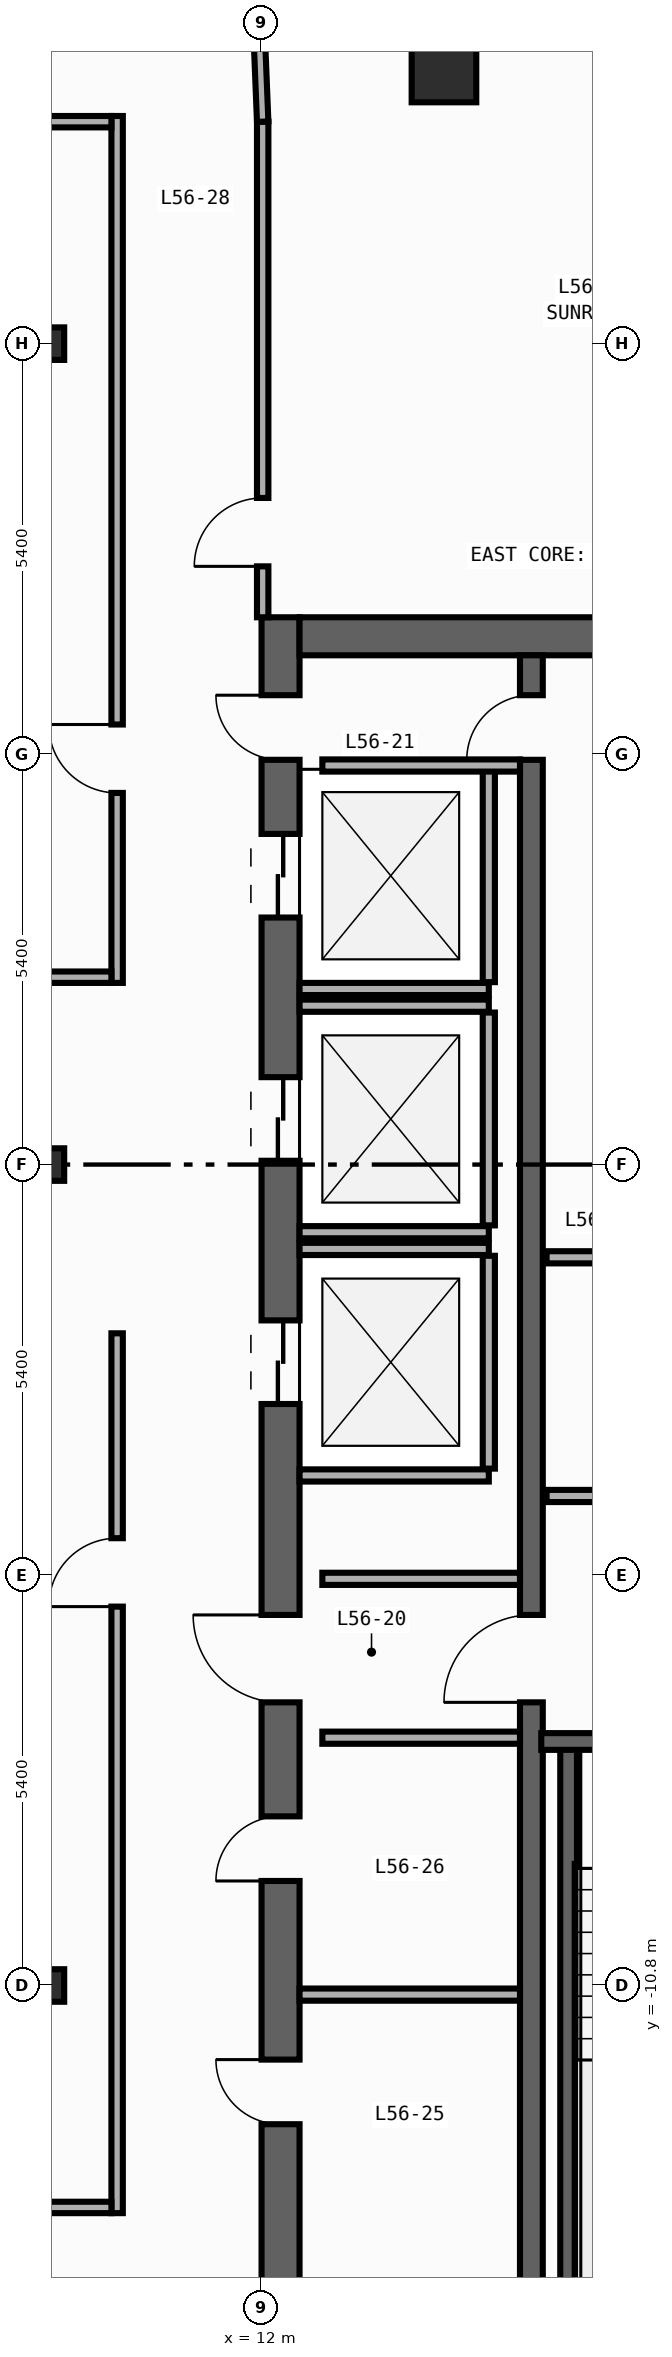
"""IFC4 building model, lengths in metres.
Left out: names, types, materials, properties, quantities, classifications, styles, units other than length and angle.
Written with IfcOpenShell. Run it as: python <this file> out.ifc"""

import sys

from ifc_helpers import new_model, si_unit, direction, frame, frame_2d, origin, origin_2d, place, context, subcontext, project, spatial, rectangle, i_section, extrude, element, fill, save


model = new_model("IFC4")
c1 = context("Model", 3, precision=1e-05, world=origin(), true_north=direction((0.0, 1.0)))
c2 = subcontext(c1, "Body", "Model", "MODEL_VIEW")
j1 = project(units=[si_unit("LENGTHUNIT", "METRE"), si_unit("PLANEANGLEUNIT", "RADIAN")], contexts=[c1])
p1 = place(None, origin())
s1 = spatial("IfcSite", under=j1, at=p1, CompositionType="ELEMENT")
p2 = place(p1, origin())
s2 = spatial("IfcBuilding", under=s1, at=p2, CompositionType="ELEMENT")
p3 = place(p2, frame((0.0, 0.0, 240.4)))
s3 = spatial("IfcBuildingStorey", under=s2, at=p3, CompositionType="ELEMENT", Elevation=240.4)
p4 = place(p3, frame((12.25, -19.8, 0.0), z_axis=(0.0, 0.0, 1.0), x_axis=(0.0, 1.0, 0.0)))
e1 = element("IfcWall", 1, at=p4, inside=s3, PredefinedType="SHEAR", context=c2, shape_type="SweptSolid", body=[
    extrude(rectangle(XDim=27.0, YDim=0.5, at=frame_2d((13.5, 0.0))), origin(), (0.0, 0.0, 1.0), 3.34),
])
p5 = place(p4, frame((23.05, 0.0, 0.0)))
e2 = element("IfcOpeningElement", 2, at=p5, cuts=e1, PredefinedType="OPENING", context=c2, shape_type="SweptSolid", body=[
    extrude(rectangle(XDim=1.1, YDim=2.2, at=frame_2d((0.55, 1.1))), frame((0.0, 0.26, 0.0), z_axis=(0.0, -1.0, 0.0), x_axis=(1.0, 0.0, 0.0)), (0.0, 0.0, 1.0), 0.52),
])
p6 = place(p4, frame((19.85, 0.0, 0.0)))
e3 = element("IfcOpeningElement", 3, at=p6, cuts=e1, PredefinedType="OPENING", context=c2, shape_type="SweptSolid", body=[
    extrude(rectangle(XDim=1.1, YDim=2.2, at=frame_2d((0.55, 1.1))), frame((0.0, 0.26, 0.0), z_axis=(0.0, -1.0, 0.0), x_axis=(1.0, 0.0, 0.0)), (0.0, 0.0, 1.0), 0.52),
])
p7 = place(p4, frame((16.65, 0.0, 0.0)))
e4 = element("IfcOpeningElement", 4, at=p7, cuts=e1, PredefinedType="OPENING", context=c2, shape_type="SweptSolid", body=[
    extrude(rectangle(XDim=1.1, YDim=2.2, at=frame_2d((0.55, 1.1))), frame((0.0, 0.26, 0.0), z_axis=(0.0, -1.0, 0.0), x_axis=(1.0, 0.0, 0.0)), (0.0, 0.0, 1.0), 0.52),
])
p8 = place(p4, frame((7.175, 0.0, 0.0)))
e5 = element("IfcOpeningElement", 5, at=p8, cuts=e1, PredefinedType="OPENING", context=c2, shape_type="SweptSolid", body=[
    extrude(rectangle(XDim=0.85, YDim=2.1, at=frame_2d((0.425, 1.05))), frame((0.0, 0.26, 0.0), z_axis=(0.0, -1.0, 0.0), x_axis=(1.0, 0.0, 0.0)), (0.0, 0.0, 1.0), 0.52),
])
p9 = place(p4, frame((10.375, 0.0, 0.0)))
e6 = element("IfcOpeningElement", 6, at=p9, cuts=e1, PredefinedType="OPENING", context=c2, shape_type="SweptSolid", body=[
    extrude(rectangle(XDim=0.85, YDim=2.1, at=frame_2d((0.425, 1.05))), frame((0.0, 0.26, 0.0), z_axis=(0.0, -1.0, 0.0), x_axis=(1.0, 0.0, 0.0)), (0.0, 0.0, 1.0), 0.52),
])
p10 = place(p4, frame((12.725, 0.0, 0.0)))
e7 = element("IfcOpeningElement", 7, at=p10, cuts=e1, PredefinedType="OPENING", context=c2, shape_type="SweptSolid", body=[
    extrude(rectangle(XDim=1.15, YDim=2.2, at=frame_2d((0.575, 1.1))), frame((0.0, 0.26, 0.0), z_axis=(0.0, -1.0, 0.0), x_axis=(1.0, 0.0, 0.0)), (0.0, 0.0, 1.0), 0.52),
])
p11 = place(p4, frame((25.125, 0.0, 0.0)))
e8 = element("IfcOpeningElement", 8, at=p11, cuts=e1, PredefinedType="OPENING", context=c2, shape_type="SweptSolid", body=[
    extrude(rectangle(XDim=0.85, YDim=2.1, at=frame_2d((0.425, 1.05))), frame((0.0, 0.26, 0.0), z_axis=(0.0, -1.0, 0.0), x_axis=(1.0, 0.0, 0.0)), (0.0, 0.0, 1.0), 0.52),
])
p12 = place(p3, frame((12.5, 6.95, 0.0), z_axis=(0.0, 0.0, 1.0), x_axis=(1.0, 0.0, 0.0)))
e9 = element("IfcWall", 9, at=p12, inside=s3, PredefinedType="SHEAR", context=c2, shape_type="SweptSolid", body=[
    extrude(rectangle(XDim=7.4, YDim=0.5, at=frame_2d((3.7, 0.0))), origin(), (0.0, 0.0, 1.0), 3.34),
])
p13 = place(p3, frame((15.55, -19.3, 0.0), z_axis=(0.0, 0.0, 1.0), x_axis=(0.0, 1.0, 0.0)))
e10 = element("IfcWall", 10, at=p13, inside=s3, PredefinedType="SHEAR", context=c2, shape_type="SweptSolid", body=[
    extrude(rectangle(XDim=26.0, YDim=0.3, at=frame_2d((13.0, 0.0))), origin(), (0.0, 0.0, 1.0), 3.34),
])
p14 = place(p13, frame((12.225, 0.0, 0.0)))
e11 = element("IfcOpeningElement", 11, at=p14, cuts=e10, PredefinedType="OPENING", context=c2, shape_type="SweptSolid", body=[
    extrude(rectangle(XDim=1.15, YDim=2.2, at=frame_2d((0.575, 1.1))), frame((0.0, 0.16, 0.0), z_axis=(0.0, -1.0, 0.0), x_axis=(1.0, 0.0, 0.0)), (0.0, 0.0, 1.0), 0.32),
])
p15 = place(p13, frame((24.625, 0.0, 0.0)))
e12 = element("IfcOpeningElement", 12, at=p15, cuts=e10, PredefinedType="OPENING", context=c2, shape_type="SweptSolid", body=[
    extrude(rectangle(XDim=0.85, YDim=2.1, at=frame_2d((0.425, 1.05))), frame((0.0, 0.16, 0.0), z_axis=(0.0, -1.0, 0.0), x_axis=(1.0, 0.0, 0.0)), (0.0, 0.0, 1.0), 0.32),
])
p16 = place(p3, frame((16.04, -19.01, 0.0), z_axis=(0.0, 0.0, 1.0), x_axis=(0.0, 1.0, 0.0)))
e13 = element("IfcWall", 13, at=p16, inside=s3, PredefinedType="SHEAR", context=c2, shape_type="SweptSolid", body=[
    extrude(rectangle(XDim=11.42, YDim=0.22, at=frame_2d((5.71, 0.0))), origin(), (0.0, 0.0, 1.0), 3.34),
])
p17 = place(p3, frame((19.92, -7.59, 0.0), z_axis=(0.0, 0.0, 1.0), x_axis=(-1.0, 0.0, 0.0)))
e14 = element("IfcWall", 14, at=p17, inside=s3, PredefinedType="SHEAR", context=c2, shape_type="SweptSolid", body=[
    extrude(rectangle(XDim=4.24, YDim=0.22, at=frame_2d((2.12, 0.0))), origin(), (0.0, 0.0, 1.0), 3.34),
])
p18 = place(p17, frame((1.08, 0.0, 0.0)))
e15 = element("IfcOpeningElement", 15, at=p18, cuts=e14, PredefinedType="OPENING", context=c2, shape_type="SweptSolid", body=[
    extrude(rectangle(XDim=1.1, YDim=2.2, at=frame_2d((0.55, 1.1))), frame((0.0, 0.12, 0.0), z_axis=(0.0, -1.0, 0.0), x_axis=(1.0, 0.0, 0.0)), (0.0, 0.0, 1.0), 0.24),
])
for number, where, z_axis, x_axis in (
    (16, (9.2, -10.8, 0.0), (0.0, 0.0, 1.0), (1.0, 0.0, 0.0)),
    (17, (9.2, 0.0, 0.0), (0.0, 0.0, 1.0), (1.0, 0.0, 0.0)),
    (18, (9.2, 10.8, 0.0), (0.0, 0.0, 1.0), (1.0, 0.0, 0.0)),
):
    element("IfcColumn", number, at=place(p3, frame(where, z_axis=z_axis, x_axis=x_axis)), inside=s3, PredefinedType="COLUMN", context=c2, shape_type="SweptSolid", body=[
        extrude(i_section(OverallWidth=0.407, OverallDepth=0.428, WebThickness=0.02, FlangeThickness=0.035, FilletRadius=0.022, at=origin_2d()), origin(), (0.0, 0.0, 1.0), 3.6),
    ])
p19 = place(p3, frame((14.4, 14.4, 0.0), z_axis=(0.0, 0.0, 1.0), x_axis=(1.0, 0.0, 0.0)))
e19 = element("IfcColumn", 19, at=p19, inside=s3, PredefinedType="COLUMN", context=c2, shape_type="SweptSolid", body=[
    extrude(rectangle(XDim=0.85, YDim=0.85, at=origin_2d()), origin(), (0.0, 0.0, 1.0), 3.6),
])
p20 = place(p3, frame((12.5, 2.31, 0.0), z_axis=(0.0, 0.0, 1.0), x_axis=(1.0, 0.0, 0.0)))
e20 = element("IfcWall", 20, at=p20, inside=s3, PredefinedType="STANDARD", context=c2, shape_type="SweptSolid", body=[
    extrude(rectangle(XDim=2.49, YDim=0.16, at=frame_2d((1.245, 0.0))), origin(), (0.0, 0.0, 1.0), 3.34),
])
p21 = place(p3, frame((14.99, 2.4, 0.0), z_axis=(0.0, 0.0, 1.0), x_axis=(0.0, 1.0, 0.0)))
e21 = element("IfcWall", 21, at=p21, inside=s3, PredefinedType="STANDARD", context=c2, shape_type="SweptSolid", body=[
    extrude(rectangle(XDim=2.8, YDim=0.16, at=frame_2d((1.4, 0.0))), origin(), (0.0, 0.0, 1.0), 3.34),
])
for number, where, z_axis, x_axis in (
    (22, (12.5, -0.89, 0.0), (0.0, 0.0, 1.0), (1.0, 0.0, 0.0)),
    (23, (12.5, 2.09, 0.0), (0.0, 0.0, 1.0), (1.0, 0.0, 0.0)),
):
    element("IfcWall", number, at=place(p3, frame(where, z_axis=z_axis, x_axis=x_axis)), inside=s3, PredefinedType="STANDARD", context=c2, shape_type="SweptSolid", body=[
        extrude(rectangle(XDim=2.49, YDim=0.16, at=frame_2d((1.245, 0.0))), origin(), (0.0, 0.0, 1.0), 3.34),
    ])
p22 = place(p3, frame((14.99, -0.8, 0.0), z_axis=(0.0, 0.0, 1.0), x_axis=(0.0, 1.0, 0.0)))
e24 = element("IfcWall", 24, at=p22, inside=s3, PredefinedType="STANDARD", context=c2, shape_type="SweptSolid", body=[
    extrude(rectangle(XDim=2.8, YDim=0.16, at=frame_2d((1.4, 0.0))), origin(), (0.0, 0.0, 1.0), 3.34),
])
for number, where, z_axis, x_axis in (
    (25, (12.5, -4.09, 0.0), (0.0, 0.0, 1.0), (1.0, 0.0, 0.0)),
    (26, (12.5, -1.11, 0.0), (0.0, 0.0, 1.0), (1.0, 0.0, 0.0)),
):
    element("IfcWall", number, at=place(p3, frame(where, z_axis=z_axis, x_axis=x_axis)), inside=s3, PredefinedType="STANDARD", context=c2, shape_type="SweptSolid", body=[
        extrude(rectangle(XDim=2.49, YDim=0.16, at=frame_2d((1.245, 0.0))), origin(), (0.0, 0.0, 1.0), 3.34),
    ])
p23 = place(p3, frame((14.99, -4.0, 0.0), z_axis=(0.0, 0.0, 1.0), x_axis=(0.0, 1.0, 0.0)))
e27 = element("IfcWall", 27, at=p23, inside=s3, PredefinedType="STANDARD", context=c2, shape_type="SweptSolid", body=[
    extrude(rectangle(XDim=2.8, YDim=0.16, at=frame_2d((1.4, 0.0))), origin(), (0.0, 0.0, 1.0), 3.34),
])
p24 = place(p3, frame((15.75, -4.36, 0.0), z_axis=(0.0, 0.0, 1.0), x_axis=(1.0, 0.0, 0.0)))
e28 = element("IfcWall", 28, at=p24, inside=s3, PredefinedType="STANDARD", context=c2, shape_type="SweptSolid", body=[
    extrude(rectangle(XDim=3.8, YDim=0.16, at=frame_2d((1.9, 0.0))), origin(), (0.0, 0.0, 1.0), 3.34),
])
p25 = place(p24, frame((1.47, 0.0, 0.0)))
e29 = element("IfcOpeningElement", 29, at=p25, cuts=e28, PredefinedType="OPENING", context=c2, shape_type="SweptSolid", body=[
    extrude(rectangle(XDim=1.15, YDim=2.2, at=frame_2d((0.575, 1.1))), frame((0.0, 0.09, 0.0), z_axis=(0.0, -1.0, 0.0), x_axis=(1.0, 0.0, 0.0)), (0.0, 0.0, 1.0), 0.18),
])
p26 = place(p3, frame((15.75, -1.22, 0.0), z_axis=(0.0, 0.0, 1.0), x_axis=(1.0, 0.0, 0.0)))
e30 = element("IfcWall", 30, at=p26, inside=s3, PredefinedType="STANDARD", context=c2, shape_type="SweptSolid", body=[
    extrude(rectangle(XDim=3.8, YDim=0.16, at=frame_2d((1.9, 0.0))), origin(), (0.0, 0.0, 1.0), 3.34),
])
for number, where, z_axis, x_axis in (
    (31, (12.8, -5.45, 0.0), (0.0, 0.0, 1.0), (1.0, 0.0, 0.0)),
    (32, (12.8, -7.54, 0.0), (0.0, 0.0, 1.0), (1.0, 0.0, 0.0)),
    (33, (12.8, 5.25, 0.0), (0.0, 0.0, 1.0), (1.0, 0.0, 0.0)),
):
    element("IfcWall", number, at=place(p3, frame(where, z_axis=z_axis, x_axis=x_axis)), inside=s3, PredefinedType="STANDARD", context=c2, shape_type="SweptSolid", body=[
        extrude(rectangle(XDim=2.6, YDim=0.16, at=frame_2d((1.3, 0.0))), origin(), (0.0, 0.0, 1.0), 3.34),
    ])
p27 = place(p3, frame((12.5, -10.92, 0.0), z_axis=(0.0, 0.0, 1.0), x_axis=(1.0, 0.0, 0.0)))
e34 = element("IfcWall", 34, at=p27, inside=s3, PredefinedType="PARTITIONING", context=c2, shape_type="SweptSolid", body=[
    extrude(rectangle(XDim=2.9, YDim=0.16, at=frame_2d((1.45, 0.0))), origin(), (0.0, 0.0, 1.0), 2.44),
])
p28 = place(p3, frame((12.015, 7.2, 0.0), z_axis=(0.0, 0.0, 1.0), x_axis=(0.0, 1.0, 0.0)))
e35 = element("IfcWall", 35, at=p28, inside=s3, PredefinedType="PARTITIONING", context=c2, shape_type="SweptSolid", body=[
    extrude(rectangle(XDim=6.52, YDim=0.15, at=frame_2d((3.26, 0.0))), origin(), (0.0, 0.0, 1.0), 3.34),
])
p29 = place(p28, frame((0.67, 0.0, 0.0)))
e36 = element("IfcOpeningElement", 36, at=p29, cuts=e35, PredefinedType="OPENING", context=c2, shape_type="SweptSolid", body=[
    extrude(rectangle(XDim=0.9, YDim=2.15, at=frame_2d((0.45, 1.075))), frame((0.0, 0.085, 0.0), z_axis=(0.0, -1.0, 0.0), x_axis=(1.0, 0.0, 0.0)), (0.0, 0.0, 1.0), 0.17),
])
p30 = place(p3, frame((10.1, 2.39, 0.0), z_axis=(0.0, 0.0, 1.0), x_axis=(0.0, 1.0, 0.0)))
e37 = element("IfcWall", 37, at=p30, inside=s3, PredefinedType="PARTITIONING", context=c2, shape_type="SweptSolid", body=[
    extrude(rectangle(XDim=11.405, YDim=0.15, at=frame_2d((5.703, 0.0))), origin(), (0.0, 0.0, 1.0), 3.34),
])
p31 = place(p30, frame((2.5, 0.0, 0.0)))
e38 = element("IfcOpeningElement", 38, at=p31, cuts=e37, PredefinedType="OPENING", context=c2, shape_type="SweptSolid", body=[
    extrude(rectangle(XDim=0.9, YDim=2.15, at=frame_2d((0.45, 1.075))), frame((0.0, 0.085, 0.0), z_axis=(0.0, -1.0, 0.0), x_axis=(1.0, 0.0, 0.0)), (0.0, 0.0, 1.0), 0.17),
])
p32 = place(p3, frame((10.1, -13.795, 0.0), z_axis=(0.0, 0.0, 1.0), x_axis=(0.0, 1.0, 0.0)))
e39 = element("IfcWall", 39, at=p32, inside=s3, PredefinedType="PARTITIONING", context=c2, shape_type="SweptSolid", body=[
    extrude(rectangle(XDim=11.575, YDim=0.15, at=frame_2d((5.788, 0.0))), origin(), (0.0, 0.0, 1.0), 3.34),
])
p33 = place(p32, frame((7.979, 0.0, 0.0)))
e40 = element("IfcOpeningElement", 40, at=p33, cuts=e39, PredefinedType="OPENING", context=c2, shape_type="SweptSolid", body=[
    extrude(rectangle(XDim=0.9, YDim=2.15, at=frame_2d((0.45, 1.075))), frame((0.0, 0.085, 0.0), z_axis=(0.0, -1.0, 0.0), x_axis=(1.0, 0.0, 0.0)), (0.0, 0.0, 1.0), 0.17),
])
p34 = place(p3, frame((2.77, 2.465, 0.0), z_axis=(0.0, 0.0, 1.0), x_axis=(1.0, 0.0, 0.0)))
e41 = element("IfcWall", 41, at=p34, inside=s3, PredefinedType="PARTITIONING", context=c2, shape_type="SweptSolid", body=[
    extrude(rectangle(XDim=7.255, YDim=0.15, at=frame_2d((3.627, 0.0))), origin(), (0.0, 0.0, 1.0), 3.34),
])
p35 = place(p34, frame((0.46, 0.0, 0.0)))
e42 = element("IfcOpeningElement", 42, at=p35, cuts=e41, PredefinedType="OPENING", context=c2, shape_type="SweptSolid", body=[
    extrude(rectangle(XDim=0.9, YDim=2.15, at=frame_2d((0.45, 1.075))), frame((0.0, 0.085, 0.0), z_axis=(0.0, -1.0, 0.0), x_axis=(1.0, 0.0, 0.0)), (0.0, 0.0, 1.0), 0.17),
])
p36 = place(p3, frame((12.015, 13.72, 0.0), z_axis=(0.0, 0.0, 1.0), x_axis=(-0.040046877756, 0.99919780203, 0.0)))
e43 = element("IfcWall", 43, at=p36, inside=s3, PredefinedType="PARTITIONING", context=c2, shape_type="SweptSolid", body=[
    extrude(rectangle(XDim=1.731, YDim=0.15, at=frame_2d((0.866, 0.0))), origin(), (0.0, 0.0, 1.0), 3.34),
])
p37 = place(p3, frame((2.77, 13.72, 0.0), z_axis=(0.0, 0.0, 1.0), x_axis=(1.0, 0.0, 0.0)))
e44 = element("IfcWall", 44, at=p37, inside=s3, PredefinedType="PARTITIONING", context=c2, shape_type="SweptSolid", body=[
    extrude(rectangle(XDim=7.255, YDim=0.15, at=frame_2d((3.627, 0.0))), origin(), (0.0, 0.0, 1.0), 3.34),
])
p38 = place(p37, frame((0.46, 0.0, 0.0)))
e45 = element("IfcOpeningElement", 45, at=p38, cuts=e44, PredefinedType="OPENING", context=c2, shape_type="SweptSolid", body=[
    extrude(rectangle(XDim=0.9, YDim=2.15, at=frame_2d((0.45, 1.075))), frame((0.0, 0.085, 0.0), z_axis=(0.0, -1.0, 0.0), x_axis=(1.0, 0.0, 0.0)), (0.0, 0.0, 1.0), 0.17),
])
p39 = place(p3, frame((2.94, -13.72, 0.0), z_axis=(0.0, 0.0, 1.0), x_axis=(1.0, 0.0, 0.0)))
e46 = element("IfcWall", 46, at=p39, inside=s3, PredefinedType="PARTITIONING", context=c2, shape_type="SweptSolid", body=[
    extrude(rectangle(XDim=7.085, YDim=0.15, at=frame_2d((3.542, 0.0))), origin(), (0.0, 0.0, 1.0), 3.34),
])
p40 = place(p39, frame((2.08, 0.0, 0.0)))
e47 = element("IfcOpeningElement", 47, at=p40, cuts=e46, PredefinedType="OPENING", context=c2, shape_type="SweptSolid", body=[
    extrude(rectangle(XDim=0.9, YDim=2.15, at=frame_2d((0.45, 1.075))), frame((0.0, 0.085, 0.0), z_axis=(0.0, -1.0, 0.0), x_axis=(1.0, 0.0, 0.0)), (0.0, 0.0, 1.0), 0.17),
])
p41 = place(p5, origin())
e48 = element("IfcDoor", 48, at=p41, inside=s3, OperationType="DOUBLE_DOOR_SLIDING", PredefinedType="DOOR", context=c2, shape_type="SweptSolid", body=[
    extrude(rectangle(XDim=1.1, YDim=2.2, at=frame_2d((0.55, 1.1))), frame((0.0, 0.025, 0.0), z_axis=(0.0, -1.0, 0.0), x_axis=(1.0, 0.0, 0.0)), (0.0, 0.0, 1.0), 0.05),
])
fill(e2, e48)
p42 = place(p6, origin())
e49 = element("IfcDoor", 49, at=p42, inside=s3, OperationType="DOUBLE_DOOR_SLIDING", PredefinedType="DOOR", context=c2, shape_type="SweptSolid", body=[
    extrude(rectangle(XDim=1.1, YDim=2.2, at=frame_2d((0.55, 1.1))), frame((0.0, 0.025, 0.0), z_axis=(0.0, -1.0, 0.0), x_axis=(1.0, 0.0, 0.0)), (0.0, 0.0, 1.0), 0.05),
])
fill(e3, e49)
p43 = place(p7, origin())
e50 = element("IfcDoor", 50, at=p43, inside=s3, OperationType="DOUBLE_DOOR_SLIDING", PredefinedType="DOOR", context=c2, shape_type="SweptSolid", body=[
    extrude(rectangle(XDim=1.1, YDim=2.2, at=frame_2d((0.55, 1.1))), frame((0.0, 0.025, 0.0), z_axis=(0.0, -1.0, 0.0), x_axis=(1.0, 0.0, 0.0)), (0.0, 0.0, 1.0), 0.05),
])
fill(e4, e50)
p44 = place(p8, origin())
e51 = element("IfcDoor", 51, at=p44, inside=s3, OperationType="SINGLE_SWING_RIGHT", PredefinedType="DOOR", context=c2, shape_type="SweptSolid", body=[
    extrude(rectangle(XDim=0.85, YDim=2.1, at=frame_2d((0.425, 1.05))), frame((0.0, 0.025, 0.0), z_axis=(0.0, -1.0, 0.0), x_axis=(1.0, 0.0, 0.0)), (0.0, 0.0, 1.0), 0.05),
])
fill(e5, e51)
p45 = place(p9, origin())
e52 = element("IfcDoor", 52, at=p45, inside=s3, OperationType="SINGLE_SWING_LEFT", PredefinedType="DOOR", context=c2, shape_type="SweptSolid", body=[
    extrude(rectangle(XDim=0.85, YDim=2.1, at=frame_2d((0.425, 1.05))), frame((0.0, 0.025, 0.0), z_axis=(0.0, -1.0, 0.0), x_axis=(1.0, 0.0, 0.0)), (0.0, 0.0, 1.0), 0.05),
])
fill(e6, e52)
p46 = place(p10, origin())
e53 = element("IfcDoor", 53, at=p46, inside=s3, OperationType="SINGLE_SWING_RIGHT", PredefinedType="DOOR", context=c2, shape_type="SweptSolid", body=[
    extrude(rectangle(XDim=1.15, YDim=2.2, at=frame_2d((0.575, 1.1))), frame((0.0, 0.025, 0.0), z_axis=(0.0, -1.0, 0.0), x_axis=(1.0, 0.0, 0.0)), (0.0, 0.0, 1.0), 0.05),
])
fill(e7, e53)
p47 = place(p14, origin())
e54 = element("IfcDoor", 54, at=p47, inside=s3, OperationType="SINGLE_SWING_LEFT", PredefinedType="DOOR", context=c2, shape_type="SweptSolid", body=[
    extrude(rectangle(XDim=1.15, YDim=2.2, at=frame_2d((0.575, 1.1))), frame((0.0, 0.025, 0.0), z_axis=(0.0, -1.0, 0.0), x_axis=(1.0, 0.0, 0.0)), (0.0, 0.0, 1.0), 0.05),
])
fill(e11, e54)
p48 = place(p11, origin())
e55 = element("IfcDoor", 55, at=p48, inside=s3, OperationType="SINGLE_SWING_RIGHT", PredefinedType="DOOR", context=c2, shape_type="SweptSolid", body=[
    extrude(rectangle(XDim=0.85, YDim=2.1, at=frame_2d((0.425, 1.05))), frame((0.0, 0.025, 0.0), z_axis=(0.0, -1.0, 0.0), x_axis=(1.0, 0.0, 0.0)), (0.0, 0.0, 1.0), 0.05),
])
fill(e8, e55)
p49 = place(p15, origin())
e56 = element("IfcDoor", 56, at=p49, inside=s3, OperationType="SINGLE_SWING_LEFT", PredefinedType="DOOR", context=c2, shape_type="SweptSolid", body=[
    extrude(rectangle(XDim=0.85, YDim=2.1, at=frame_2d((0.425, 1.05))), frame((0.0, 0.025, 0.0), z_axis=(0.0, -1.0, 0.0), x_axis=(1.0, 0.0, 0.0)), (0.0, 0.0, 1.0), 0.05),
])
fill(e12, e56)
p50 = place(p29, origin())
e57 = element("IfcDoor", 57, at=p50, inside=s3, OperationType="SINGLE_SWING_LEFT", PredefinedType="DOOR", context=c2, shape_type="SweptSolid", body=[
    extrude(rectangle(XDim=0.9, YDim=2.15, at=frame_2d((0.45, 1.075))), frame((0.0, 0.025, 0.0), z_axis=(0.0, -1.0, 0.0), x_axis=(1.0, 0.0, 0.0)), (0.0, 0.0, 1.0), 0.05),
])
fill(e36, e57)
p51 = place(p31, origin())
e58 = element("IfcDoor", 58, at=p51, inside=s3, OperationType="SINGLE_SWING_RIGHT", PredefinedType="DOOR", context=c2, shape_type="SweptSolid", body=[
    extrude(rectangle(XDim=0.9, YDim=2.15, at=frame_2d((0.45, 1.075))), frame((0.0, 0.025, 0.0), z_axis=(0.0, -1.0, 0.0), x_axis=(1.0, 0.0, 0.0)), (0.0, 0.0, 1.0), 0.05),
])
fill(e38, e58)
p52 = place(p33, origin())
e59 = element("IfcDoor", 59, at=p52, inside=s3, OperationType="SINGLE_SWING_LEFT", PredefinedType="DOOR", context=c2, shape_type="SweptSolid", body=[
    extrude(rectangle(XDim=0.9, YDim=2.15, at=frame_2d((0.45, 1.075))), frame((0.0, 0.025, 0.0), z_axis=(0.0, -1.0, 0.0), x_axis=(1.0, 0.0, 0.0)), (0.0, 0.0, 1.0), 0.05),
])
fill(e40, e59)
save(model, sys.argv[1])
